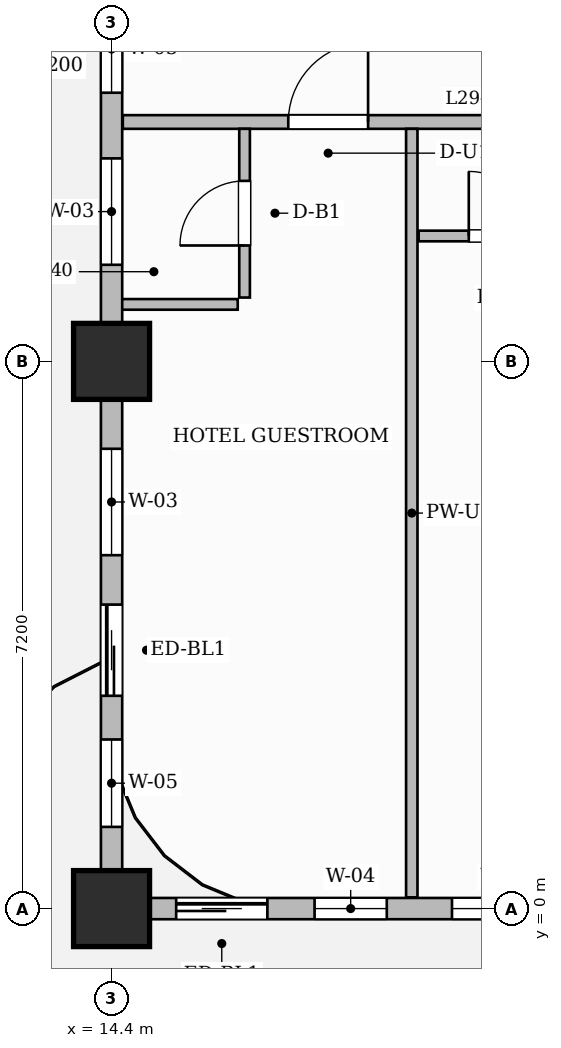
"""IFC4 building model, lengths in metres.
Left out: names, types, materials, properties, quantities, classifications, styles, units other than length and angle.
Written with IfcOpenShell. Run it as: python <this file> out.ifc"""

import sys

from ifc_helpers import new_model, si_unit, direction, frame, frame_2d, origin, origin_2d, place, context, subcontext, project, spatial, rectangle, extrude, source, transform, mapped, element, fill, save


model = new_model("IFC4")
c1 = context("Model", 3, precision=1e-05, world=origin(), true_north=direction((0.0, 1.0)))
c2 = subcontext(c1, "Body", "Model", "MODEL_VIEW")
j1 = project(units=[si_unit("LENGTHUNIT", "METRE"), si_unit("PLANEANGLEUNIT", "RADIAN")], contexts=[c1])
p1 = place(None, origin())
s1 = spatial("IfcSite", under=j1, at=p1, CompositionType="ELEMENT")
p2 = place(p1, origin())
s2 = spatial("IfcBuilding", under=s1, at=p2, CompositionType="ELEMENT")
p3 = place(p2, frame((0.0, 0.0, 119.2)))
s3 = spatial("IfcBuildingStorey", under=s2, at=p3, CompositionType="ELEMENT", Elevation=119.2)
m1 = source(origin(), c2, "Body", "SweptSolid", [
    extrude(rectangle(XDim=1.0, YDim=1.0, at=origin_2d()), origin(), (0.0, 0.0, 1.0), 3.7),
])
for number, where, z_axis, x_axis in (
    (1, (14.4, 0.0, 0.0), (0.0, 0.0, 1.0), (1.0, 0.0, 0.0)),
    (2, (14.4, 7.2, 0.0), (0.0, 0.0, 1.0), (1.0, 0.0, 0.0)),
):
    element("IfcColumn", number, at=place(p3, frame(where, z_axis=z_axis, x_axis=x_axis)), inside=s3, PredefinedType="COLUMN", context=c2, shape_type="MappedRepresentation", body=[
        mapped(m1, transform((0.0, 0.0, 0.0), scale=1.0)),
    ])
p4 = place(p3, frame((14.548, 10.35, 0.0), z_axis=(0.0, 0.0, 1.0), x_axis=(1.0, 0.0, 0.0)))
e3 = element("IfcWall", 3, at=p4, inside=s3, PredefinedType="PARTITIONING", context=c2, shape_type="SweptSolid", body=[
    extrude(rectangle(XDim=15.562, YDim=0.18, at=frame_2d((7.781, 0.0))), origin(), (0.0, 0.0, 1.0), 3.45),
])
p5 = place(p4, frame((2.177, 0.0, 0.0)))
e4 = element("IfcOpeningElement", 4, at=p5, cuts=e3, PredefinedType="OPENING", context=c2, shape_type="SweptSolid", body=[
    extrude(rectangle(XDim=1.05, YDim=2.25, at=frame_2d((0.525, 1.125))), frame((0.0, 0.1, 0.0), z_axis=(0.0, -1.0, 0.0), x_axis=(1.0, 0.0, 0.0)), (0.0, 0.0, 1.0), 0.2),
])
p6 = place(p4, frame((7.162, 0.0, 0.0)))
e5 = element("IfcOpeningElement", 5, at=p6, cuts=e3, PredefinedType="OPENING", context=c2, shape_type="SweptSolid", body=[
    extrude(rectangle(XDim=1.0, YDim=2.2, at=frame_2d((0.5, 1.1))), frame((0.0, 0.1, 0.0), z_axis=(0.0, -1.0, 0.0), x_axis=(1.0, 0.0, 0.0)), (0.0, 0.0, 1.0), 0.2),
])
p7 = place(p4, frame((11.007, 0.0, 0.0)))
e6 = element("IfcOpeningElement", 6, at=p7, cuts=e3, PredefinedType="OPENING", context=c2, shape_type="SweptSolid", body=[
    extrude(rectangle(XDim=1.05, YDim=2.25, at=frame_2d((0.525, 1.125))), frame((0.0, 0.1, 0.0), z_axis=(0.0, -1.0, 0.0), x_axis=(1.0, 0.0, 0.0)), (0.0, 0.0, 1.0), 0.2),
])
p8 = place(p4, frame((14.422, 0.0, 0.0)))
e7 = element("IfcOpeningElement", 7, at=p8, cuts=e3, PredefinedType="OPENING", context=c2, shape_type="SweptSolid", body=[
    extrude(rectangle(XDim=1.0, YDim=2.2, at=frame_2d((0.5, 1.1))), frame((0.0, 0.1, 0.0), z_axis=(0.0, -1.0, 0.0), x_axis=(1.0, 0.0, 0.0)), (0.0, 0.0, 1.0), 0.2),
])
p9 = place(p3, frame((16.15, 8.04, 0.0), z_axis=(0.0, 0.0, 1.0), x_axis=(0.0, 1.0, 0.0)))
e8 = element("IfcWall", 8, at=p9, inside=s3, PredefinedType="PARTITIONING", context=c2, shape_type="SweptSolid", body=[
    extrude(rectangle(XDim=2.22, YDim=0.14, at=frame_2d((1.11, 0.0))), origin(), (0.0, 0.0, 1.0), 3.45),
])
p10 = place(p9, frame((0.685, 0.0, 0.0)))
e9 = element("IfcOpeningElement", 9, at=p10, cuts=e8, PredefinedType="OPENING", context=c2, shape_type="SweptSolid", body=[
    extrude(rectangle(XDim=0.85, YDim=2.1, at=frame_2d((0.425, 1.05))), frame((0.0, 0.08, 0.0), z_axis=(0.0, -1.0, 0.0), x_axis=(1.0, 0.0, 0.0)), (0.0, 0.0, 1.0), 0.16),
])
p11 = place(p3, frame((14.49, 7.95, 0.0), z_axis=(0.0, 0.0, 1.0), x_axis=(1.0, 0.0, 0.0)))
e10 = element("IfcWall", 10, at=p11, inside=s3, PredefinedType="PARTITIONING", context=c2, shape_type="SweptSolid", body=[
    extrude(rectangle(XDim=1.57, YDim=0.14, at=frame_2d((0.785, 0.0))), origin(), (0.0, 0.0, 1.0), 3.45),
])
p12 = place(p3, frame((18.35, 0.148, 0.0), z_axis=(0.0, 0.0, 1.0), x_axis=(0.0, 1.0, 0.0)))
e11 = element("IfcWall", 11, at=p12, inside=s3, PredefinedType="PARTITIONING", context=c2, shape_type="SweptSolid", body=[
    extrude(rectangle(XDim=10.112, YDim=0.15, at=frame_2d((5.056, 0.0))), origin(), (0.0, 0.0, 1.0), 3.45),
])
p13 = place(p3, frame((18.44, 8.85, 0.0), z_axis=(0.0, 0.0, 1.0), x_axis=(1.0, 0.0, 0.0)))
e12 = element("IfcWall", 12, at=p13, inside=s3, PredefinedType="PARTITIONING", context=c2, shape_type="SweptSolid", body=[
    extrude(rectangle(XDim=2.17, YDim=0.14, at=frame_2d((1.085, 0.0))), origin(), (0.0, 0.0, 1.0), 3.45),
])
p14 = place(p13, frame((0.66, 0.0, 0.0)))
e13 = element("IfcOpeningElement", 13, at=p14, cuts=e12, PredefinedType="OPENING", context=c2, shape_type="SweptSolid", body=[
    extrude(rectangle(XDim=0.85, YDim=2.1, at=frame_2d((0.425, 1.05))), frame((0.0, 0.08, 0.0), z_axis=(0.0, -1.0, 0.0), x_axis=(1.0, 0.0, 0.0)), (0.0, 0.0, 1.0), 0.16),
])
p15 = place(p3, frame((14.4, 0.0, 0.0), z_axis=(0.0, 0.0, 1.0), x_axis=(1.0, 0.0, 0.0)))
e14 = element("IfcWall", 14, at=p15, inside=s3, PredefinedType="SOLIDWALL", context=c2, shape_type="SweptSolid", body=[
    extrude(rectangle(XDim=35.4, YDim=0.28, at=frame_2d((17.7, 0.0))), origin(), (0.0, 0.0, 1.0), 2.935),
])
p16 = place(p15, frame((0.85, 0.0, 0.0)))
e15 = element("IfcOpeningElement", 15, at=p16, cuts=e14, PredefinedType="OPENING", context=c2, shape_type="SweptSolid", body=[
    extrude(rectangle(XDim=1.2, YDim=2.2, at=frame_2d((0.6, 1.1))), frame((0.0, 0.15, 0.0), z_axis=(0.0, -1.0, 0.0), x_axis=(1.0, 0.0, 0.0)), (0.0, 0.0, 1.0), 0.3),
])
p17 = place(p15, frame((2.671, 0.0, 0.8)))
e16 = element("IfcOpeningElement", 16, at=p17, cuts=e14, PredefinedType="OPENING", context=c2, shape_type="SweptSolid", body=[
    extrude(rectangle(XDim=0.95, YDim=1.75, at=frame_2d((0.475, 0.875))), frame((0.0, 0.15, 0.0), z_axis=(0.0, -1.0, 0.0), x_axis=(1.0, 0.0, 0.0)), (0.0, 0.0, 1.0), 0.3),
])
p18 = place(p15, frame((4.479, 0.0, 0.8)))
e17 = element("IfcOpeningElement", 17, at=p18, cuts=e14, PredefinedType="OPENING", context=c2, shape_type="SweptSolid", body=[
    extrude(rectangle(XDim=1.4, YDim=1.85, at=frame_2d((0.7, 0.925))), frame((0.0, 0.15, 0.0), z_axis=(0.0, -1.0, 0.0), x_axis=(1.0, 0.0, 0.0)), (0.0, 0.0, 1.0), 0.3),
])
p19 = place(p15, frame((8.181, 0.0, 0.8)))
e18 = element("IfcOpeningElement", 18, at=p19, cuts=e14, PredefinedType="OPENING", context=c2, shape_type="SweptSolid", body=[
    extrude(rectangle(XDim=0.95, YDim=1.75, at=frame_2d((0.475, 0.875))), frame((0.0, 0.15, 0.0), z_axis=(0.0, -1.0, 0.0), x_axis=(1.0, 0.0, 0.0)), (0.0, 0.0, 1.0), 0.3),
])
p20 = place(p15, frame((9.845, 0.0, 0.8)))
e19 = element("IfcOpeningElement", 19, at=p20, cuts=e14, PredefinedType="OPENING", context=c2, shape_type="SweptSolid", body=[
    extrude(rectangle(XDim=1.8, YDim=1.85, at=frame_2d((0.9, 0.925))), frame((0.0, 0.15, 0.0), z_axis=(0.0, -1.0, 0.0), x_axis=(1.0, 0.0, 0.0)), (0.0, 0.0, 1.0), 0.3),
])
p21 = place(p15, frame((12.414, 0.0, 0.8)))
e20 = element("IfcOpeningElement", 20, at=p21, cuts=e14, PredefinedType="OPENING", context=c2, shape_type="SweptSolid", body=[
    extrude(rectangle(XDim=0.95, YDim=1.75, at=frame_2d((0.475, 0.875))), frame((0.0, 0.15, 0.0), z_axis=(0.0, -1.0, 0.0), x_axis=(1.0, 0.0, 0.0)), (0.0, 0.0, 1.0), 0.3),
])
p22 = place(p15, frame((16.804, 0.0, 0.8)))
e21 = element("IfcOpeningElement", 21, at=p22, cuts=e14, PredefinedType="OPENING", context=c2, shape_type="SweptSolid", body=[
    extrude(rectangle(XDim=1.8, YDim=1.85, at=frame_2d((0.9, 0.925))), frame((0.0, 0.15, 0.0), z_axis=(0.0, -1.0, 0.0), x_axis=(1.0, 0.0, 0.0)), (0.0, 0.0, 1.0), 0.3),
])
p23 = place(p15, frame((21.725, 0.0, 0.8)))
e22 = element("IfcOpeningElement", 22, at=p23, cuts=e14, PredefinedType="OPENING", context=c2, shape_type="SweptSolid", body=[
    extrude(rectangle(XDim=1.8, YDim=1.85, at=frame_2d((0.9, 0.925))), frame((0.0, 0.15, 0.0), z_axis=(0.0, -1.0, 0.0), x_axis=(1.0, 0.0, 0.0)), (0.0, 0.0, 1.0), 0.3),
])
p24 = place(p15, frame((24.475, 0.0, 0.8)))
e23 = element("IfcOpeningElement", 23, at=p24, cuts=e14, PredefinedType="OPENING", context=c2, shape_type="SweptSolid", body=[
    extrude(rectangle(XDim=1.8, YDim=1.85, at=frame_2d((0.9, 0.925))), frame((0.0, 0.15, 0.0), z_axis=(0.0, -1.0, 0.0), x_axis=(1.0, 0.0, 0.0)), (0.0, 0.0, 1.0), 0.3),
])
p25 = place(p15, frame((29.075, 0.0, 0.8)))
e24 = element("IfcOpeningElement", 24, at=p25, cuts=e14, PredefinedType="OPENING", context=c2, shape_type="SweptSolid", body=[
    extrude(rectangle(XDim=1.8, YDim=1.85, at=frame_2d((0.9, 0.925))), frame((0.0, 0.15, 0.0), z_axis=(0.0, -1.0, 0.0), x_axis=(1.0, 0.0, 0.0)), (0.0, 0.0, 1.0), 0.3),
])
p26 = place(p15, frame((32.125, 0.0, 0.8)))
e25 = element("IfcOpeningElement", 25, at=p26, cuts=e14, PredefinedType="OPENING", context=c2, shape_type="SweptSolid", body=[
    extrude(rectangle(XDim=1.8, YDim=1.85, at=frame_2d((0.9, 0.925))), frame((0.0, 0.15, 0.0), z_axis=(0.0, -1.0, 0.0), x_axis=(1.0, 0.0, 0.0)), (0.0, 0.0, 1.0), 0.3),
])
p27 = place(p3, frame((14.4, 0.05, 0.0), z_axis=(0.0, 0.0, 1.0), x_axis=(0.0, 1.0, 0.0)))
e26 = element("IfcWall", 26, at=p27, inside=s3, PredefinedType="SOLIDWALL", context=c2, shape_type="SweptSolid", body=[
    extrude(rectangle(XDim=20.6, YDim=0.28, at=frame_2d((10.3, 0.0))), origin(), (0.0, 0.0, 1.0), 2.935),
])
p28 = place(p27, frame((2.75, 0.0, 0.0)))
e27 = element("IfcOpeningElement", 27, at=p28, cuts=e26, PredefinedType="OPENING", context=c2, shape_type="SweptSolid", body=[
    extrude(rectangle(XDim=1.2, YDim=2.2, at=frame_2d((0.6, 1.1))), frame((0.0, 0.15, 0.0), z_axis=(0.0, -1.0, 0.0), x_axis=(1.0, 0.0, 0.0)), (0.0, 0.0, 1.0), 0.3),
])
p29 = place(p27, frame((1.025, 0.0, 0.8)))
e28 = element("IfcOpeningElement", 28, at=p29, cuts=e26, PredefinedType="OPENING", context=c2, shape_type="SweptSolid", body=[
    extrude(rectangle(XDim=1.15, YDim=1.8, at=frame_2d((0.575, 0.9))), frame((0.0, 0.15, 0.0), z_axis=(0.0, -1.0, 0.0), x_axis=(1.0, 0.0, 0.0)), (0.0, 0.0, 1.0), 0.3),
])
p30 = place(p27, frame((4.6, 0.0, 0.8)))
e29 = element("IfcOpeningElement", 29, at=p30, cuts=e26, PredefinedType="OPENING", context=c2, shape_type="SweptSolid", body=[
    extrude(rectangle(XDim=1.4, YDim=1.85, at=frame_2d((0.7, 0.925))), frame((0.0, 0.15, 0.0), z_axis=(0.0, -1.0, 0.0), x_axis=(1.0, 0.0, 0.0)), (0.0, 0.0, 1.0), 0.3),
])
p31 = place(p27, frame((8.421, 0.0, 0.8)))
e30 = element("IfcOpeningElement", 30, at=p31, cuts=e26, PredefinedType="OPENING", context=c2, shape_type="SweptSolid", body=[
    extrude(rectangle(XDim=1.4, YDim=1.85, at=frame_2d((0.7, 0.925))), frame((0.0, 0.15, 0.0), z_axis=(0.0, -1.0, 0.0), x_axis=(1.0, 0.0, 0.0)), (0.0, 0.0, 1.0), 0.3),
])
p32 = place(p27, frame((10.685, 0.0, 0.8)))
e31 = element("IfcOpeningElement", 31, at=p32, cuts=e26, PredefinedType="OPENING", context=c2, shape_type="SweptSolid", body=[
    extrude(rectangle(XDim=1.15, YDim=1.8, at=frame_2d((0.575, 0.9))), frame((0.0, 0.15, 0.0), z_axis=(0.0, -1.0, 0.0), x_axis=(1.0, 0.0, 0.0)), (0.0, 0.0, 1.0), 0.3),
])
p33 = place(p27, frame((12.414, 0.0, 0.8)))
e32 = element("IfcOpeningElement", 32, at=p33, cuts=e26, PredefinedType="OPENING", context=c2, shape_type="SweptSolid", body=[
    extrude(rectangle(XDim=0.95, YDim=1.75, at=frame_2d((0.475, 0.875))), frame((0.0, 0.15, 0.0), z_axis=(0.0, -1.0, 0.0), x_axis=(1.0, 0.0, 0.0)), (0.0, 0.0, 1.0), 0.3),
])
p34 = place(p27, frame((16.79, 0.0, 0.8)))
e33 = element("IfcOpeningElement", 33, at=p34, cuts=e26, PredefinedType="OPENING", context=c2, shape_type="SweptSolid", body=[
    extrude(rectangle(XDim=1.8, YDim=1.85, at=frame_2d((0.9, 0.925))), frame((0.0, 0.15, 0.0), z_axis=(0.0, -1.0, 0.0), x_axis=(1.0, 0.0, 0.0)), (0.0, 0.0, 1.0), 0.3),
])
m2 = source(origin(), c2, "Body", "SweptSolid", [
    extrude(rectangle(XDim=0.85, YDim=2.1, at=frame_2d((0.425, 1.05))), frame((0.0, 0.025, 0.0), z_axis=(0.0, -1.0, 0.0), x_axis=(1.0, 0.0, 0.0)), (0.0, 0.0, 1.0), 0.05),
])
p35 = place(p10, origin())
e34 = element("IfcDoor", 34, at=p35, inside=s3, OperationType="SINGLE_SWING_LEFT", PredefinedType="DOOR", context=c2, shape_type="MappedRepresentation", body=[
    mapped(m2, transform((0.0, 0.0, 0.0), scale=1.0)),
])
fill(e9, e34)
m3 = source(origin(), c2, "Body", "SweptSolid", [
    extrude(rectangle(XDim=1.05, YDim=2.25, at=frame_2d((0.525, 1.125))), frame((0.0, 0.025, 0.0), z_axis=(0.0, -1.0, 0.0), x_axis=(1.0, 0.0, 0.0)), (0.0, 0.0, 1.0), 0.05),
])
p36 = place(p5, origin())
e35 = element("IfcDoor", 35, at=p36, inside=s3, OperationType="SINGLE_SWING_RIGHT", PredefinedType="DOOR", context=c2, shape_type="MappedRepresentation", body=[
    mapped(m3, transform((0.0, 0.0, 0.0), scale=1.0)),
])
fill(e4, e35)
p37 = place(p14, origin())
e36 = element("IfcDoor", 36, at=p37, inside=s3, OperationType="SINGLE_SWING_LEFT", PredefinedType="DOOR", context=c2, shape_type="MappedRepresentation", body=[
    mapped(m2, transform((0.0, 0.0, 0.0), scale=1.0)),
])
fill(e13, e36)
m4 = source(origin(), c2, "Body", "SweptSolid", [
    extrude(rectangle(XDim=1.2, YDim=2.2, at=frame_2d((0.6, 1.1))), frame((0.0, 0.025, 0.0), z_axis=(0.0, -1.0, 0.0), x_axis=(1.0, 0.0, 0.0)), (0.0, 0.0, 1.0), 0.05),
])
p38 = place(p16, origin())
e37 = element("IfcDoor", 37, at=p38, inside=s3, OperationType="SLIDING_TO_LEFT", PredefinedType="DOOR", context=c2, shape_type="MappedRepresentation", body=[
    mapped(m4, transform((0.0, 0.0, 0.0), scale=1.0)),
])
fill(e15, e37)
p39 = place(p28, origin())
e38 = element("IfcDoor", 38, at=p39, inside=s3, OperationType="SLIDING_TO_LEFT", PredefinedType="DOOR", context=c2, shape_type="MappedRepresentation", body=[
    mapped(m4, transform((0.0, 0.0, 0.0), scale=1.0)),
])
fill(e27, e38)
m5 = source(origin(), c2, "Body", "SweptSolid", [
    extrude(rectangle(XDim=0.95, YDim=1.75, at=frame_2d((0.475, 0.875))), frame((0.0, 0.03, 0.0), z_axis=(0.0, -1.0, 0.0), x_axis=(1.0, 0.0, 0.0)), (0.0, 0.0, 1.0), 0.06),
])
p40 = place(p17, origin())
e39 = element("IfcWindow", 39, at=p40, inside=s3, PartitioningType="SINGLE_PANEL", PredefinedType="WINDOW", context=c2, shape_type="MappedRepresentation", body=[
    mapped(m5, transform((0.0, 0.0, 0.0), scale=1.0)),
])
fill(e16, e39)
m6 = source(origin(), c2, "Body", "SweptSolid", [
    extrude(rectangle(XDim=1.4, YDim=1.85, at=frame_2d((0.7, 0.925))), frame((0.0, 0.03, 0.0), z_axis=(0.0, -1.0, 0.0), x_axis=(1.0, 0.0, 0.0)), (0.0, 0.0, 1.0), 0.06),
])
p41 = place(p18, origin())
e40 = element("IfcWindow", 40, at=p41, inside=s3, PartitioningType="SINGLE_PANEL", PredefinedType="WINDOW", context=c2, shape_type="MappedRepresentation", body=[
    mapped(m6, transform((0.0, 0.0, 0.0), scale=1.0)),
])
fill(e17, e40)
m7 = source(origin(), c2, "Body", "SweptSolid", [
    extrude(rectangle(XDim=1.15, YDim=1.8, at=frame_2d((0.575, 0.9))), frame((0.0, 0.03, 0.0), z_axis=(0.0, -1.0, 0.0), x_axis=(1.0, 0.0, 0.0)), (0.0, 0.0, 1.0), 0.06),
])
p42 = place(p29, origin())
e41 = element("IfcWindow", 41, at=p42, inside=s3, PartitioningType="SINGLE_PANEL", PredefinedType="WINDOW", context=c2, shape_type="MappedRepresentation", body=[
    mapped(m7, transform((0.0, 0.0, 0.0), scale=1.0)),
])
fill(e28, e41)
p43 = place(p30, origin())
e42 = element("IfcWindow", 42, at=p43, inside=s3, PartitioningType="SINGLE_PANEL", PredefinedType="WINDOW", context=c2, shape_type="MappedRepresentation", body=[
    mapped(m6, transform((0.0, 0.0, 0.0), scale=1.0)),
])
fill(e29, e42)
p44 = place(p31, origin())
e43 = element("IfcWindow", 43, at=p44, inside=s3, PartitioningType="SINGLE_PANEL", PredefinedType="WINDOW", context=c2, shape_type="MappedRepresentation", body=[
    mapped(m6, transform((0.0, 0.0, 0.0), scale=1.0)),
])
fill(e30, e43)
p45 = place(p32, origin())
e44 = element("IfcWindow", 44, at=p45, inside=s3, PartitioningType="SINGLE_PANEL", PredefinedType="WINDOW", context=c2, shape_type="MappedRepresentation", body=[
    mapped(m7, transform((0.0, 0.0, 0.0), scale=1.0)),
])
fill(e31, e44)
save(model, sys.argv[1])
